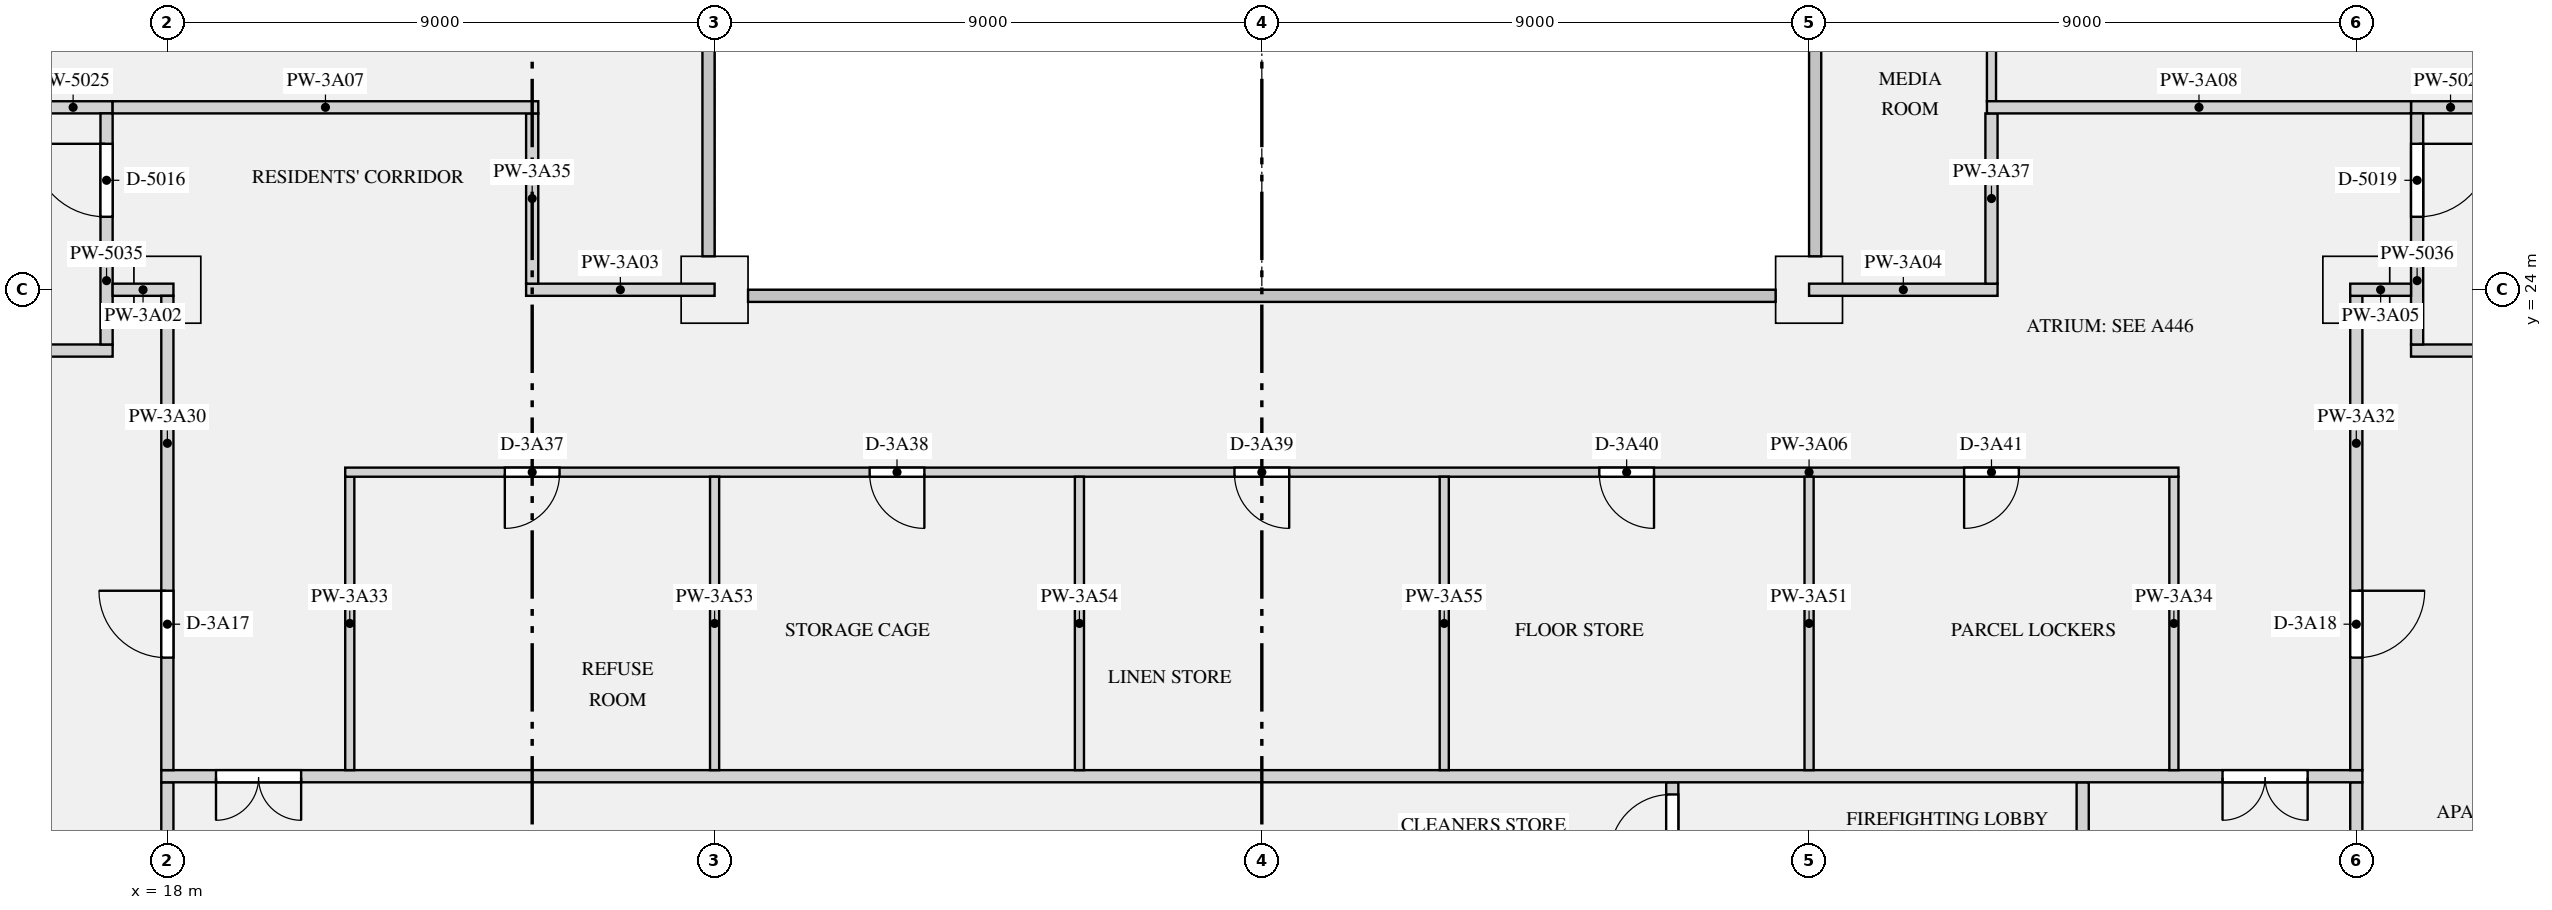
"""IFC4 building model, lengths in metres.
Left out: names, types, materials, properties, quantities, classifications, styles, units other than length and angle.
Written with IfcOpenShell. Run it as: python <this file> out.ifc"""

import sys

from ifc_helpers import new_model, si_unit, direction, frame, frame_2d, origin, origin_2d, place, context, subcontext, project, spatial, rectangle, extrude, element, fill, save


model = new_model("IFC4")
c1 = context("Model", 3, precision=1e-05, world=origin(), true_north=direction((0.0, 1.0)))
c2 = subcontext(c1, "Body", "Model", "MODEL_VIEW")
j1 = project(units=[si_unit("LENGTHUNIT", "METRE"), si_unit("PLANEANGLEUNIT", "RADIAN")], contexts=[c1])
p1 = place(None, origin())
s1 = spatial("IfcSite", under=j1, at=p1, CompositionType="ELEMENT")
p2 = place(p1, origin())
s2 = spatial("IfcBuilding", under=s1, at=p2, CompositionType="ELEMENT")
p3 = place(p2, frame((0.0, 0.0, 144.45)))
s3 = spatial("IfcBuildingStorey", under=s2, at=p3, CompositionType="ELEMENT", Elevation=144.45)
for number, where, z_axis, x_axis in (
    (1, (18.0, 24.0, 0.0), (0.0, 0.0, 1.0), (1.0, 0.0, 0.0)),
    (2, (27.0, 24.0, 0.0), (0.0, 0.0, 1.0), (1.0, 0.0, 0.0)),
    (3, (45.0, 24.0, 0.0), (0.0, 0.0, 1.0), (1.0, 0.0, 0.0)),
    (4, (54.0, 24.0, 0.0), (0.0, 0.0, 1.0), (1.0, 0.0, 0.0)),
):
    element("IfcColumn", number, at=place(p3, frame(where, z_axis=z_axis, x_axis=x_axis)), inside=s3, PredefinedType="COLUMN", context=c2, shape_type="SweptSolid", body=[
        extrude(rectangle(XDim=1.1, YDim=1.1, at=origin_2d()), origin(), (0.0, 0.0, 1.0), 3.15),
    ])
for number, where, z_axis, x_axis in (
    (5, (12.1, 23.0, 0.0), (0.0, 0.0, 1.0), (1.0, 0.0, 0.0)),
    (6, (54.9, 23.0, 0.0), (0.0, 0.0, 1.0), (1.0, 0.0, 0.0)),
):
    element("IfcWall", number, at=place(p3, frame(where, z_axis=z_axis, x_axis=x_axis)), inside=s3, PredefinedType="PARTITIONING", context=c2, shape_type="SweptSolid", body=[
        extrude(rectangle(XDim=5.0, YDim=0.2, at=frame_2d((2.5, 0.0))), origin(), (0.0, 0.0, 1.0), 2.83),
    ])
for number, where, z_axis, x_axis in (
    (7, (15.8, 27.0, 0.0), (0.0, 0.0, 1.0), (1.0, 0.0, 0.0)),
    (8, (54.9, 27.0, 0.0), (0.0, 0.0, 1.0), (1.0, 0.0, 0.0)),
):
    element("IfcWall", number, at=place(p3, frame(where, z_axis=z_axis, x_axis=x_axis)), inside=s3, PredefinedType="PARTITIONING", context=c2, shape_type="SweptSolid", body=[
        extrude(rectangle(XDim=1.3, YDim=0.2, at=frame_2d((0.65, 0.0))), origin(), (0.0, 0.0, 1.0), 2.83),
    ])
p4 = place(p3, frame((18.0, 12.5, 0.0), z_axis=(0.0, 0.0, 1.0), x_axis=(0.0, 1.0, 0.0)))
e9 = element("IfcWall", 9, at=p4, inside=s3, PredefinedType="PARTITIONING", context=c2, shape_type="SweptSolid", body=[
    extrude(rectangle(XDim=3.4, YDim=0.2, at=frame_2d((1.7, 0.0))), origin(), (0.0, 0.0, 1.0), 2.83),
])
p5 = place(p3, frame((49.5, 12.5, 0.0), z_axis=(0.0, 0.0, 1.0), x_axis=(0.0, 1.0, 0.0)))
e10 = element("IfcWall", 10, at=p5, inside=s3, PredefinedType="PARTITIONING", context=c2, shape_type="SweptSolid", body=[
    extrude(rectangle(XDim=3.4, YDim=0.2, at=frame_2d((1.7, 0.0))), origin(), (0.0, 0.0, 1.0), 2.83),
])
p6 = place(p5, frame((1.15, 0.0, 0.0)))
e11 = element("IfcOpeningElement", 11, at=p6, cuts=e10, PredefinedType="OPENING", context=c2, shape_type="SweptSolid", body=[
    extrude(rectangle(XDim=1.1, YDim=2.1, at=frame_2d((0.55, 1.05))), frame((0.0, 0.11, 0.0), z_axis=(0.0, -1.0, 0.0), x_axis=(1.0, 0.0, 0.0)), (0.0, 0.0, 1.0), 0.22),
])
p7 = place(p3, frame((54.0, 12.5, 0.0), z_axis=(0.0, 0.0, 1.0), x_axis=(0.0, 1.0, 0.0)))
e12 = element("IfcWall", 12, at=p7, inside=s3, PredefinedType="PARTITIONING", context=c2, shape_type="SweptSolid", body=[
    extrude(rectangle(XDim=3.4, YDim=0.2, at=frame_2d((1.7, 0.0))), origin(), (0.0, 0.0, 1.0), 2.83),
])
p8 = place(p3, frame((42.75, 14.575, 0.0), z_axis=(0.0, 0.0, 1.0), x_axis=(0.0, 1.0, 0.0)))
e13 = element("IfcWall", 13, at=p8, inside=s3, PredefinedType="PARTITIONING", context=c2, shape_type="SweptSolid", body=[
    extrude(rectangle(XDim=1.325, YDim=0.2, at=frame_2d((0.663, 0.0))), origin(), (0.0, 0.0, 1.0), 2.83),
])
p9 = place(p8, frame((0.125, 0.0, 0.0)))
e14 = element("IfcOpeningElement", 14, at=p9, cuts=e13, PredefinedType="OPENING", context=c2, shape_type="SweptSolid", body=[
    extrude(rectangle(XDim=1.0, YDim=2.1, at=frame_2d((0.5, 1.05))), frame((0.0, 0.11, 0.0), z_axis=(0.0, -1.0, 0.0), x_axis=(1.0, 0.0, 0.0)), (0.0, 0.0, 1.0), 0.22),
])
p10 = place(p3, frame((17.0, 23.1, 0.0), z_axis=(0.0, 0.0, 1.0), x_axis=(0.0, 1.0, 0.0)))
e15 = element("IfcWall", 15, at=p10, inside=s3, PredefinedType="PARTITIONING", context=c2, shape_type="SweptSolid", body=[
    extrude(rectangle(XDim=3.8, YDim=0.2, at=frame_2d((1.9, 0.0))), origin(), (0.0, 0.0, 1.0), 2.83),
])
p11 = place(p10, frame((2.1, 0.0, 0.0)))
e16 = element("IfcOpeningElement", 16, at=p11, cuts=e15, PredefinedType="OPENING", context=c2, shape_type="SweptSolid", body=[
    extrude(rectangle(XDim=1.2, YDim=2.1, at=frame_2d((0.6, 1.05))), frame((0.0, 0.11, 0.0), z_axis=(0.0, -1.0, 0.0), x_axis=(1.0, 0.0, 0.0)), (0.0, 0.0, 1.0), 0.22),
])
p12 = place(p3, frame((55.0, 23.1, 0.0), z_axis=(0.0, 0.0, 1.0), x_axis=(0.0, 1.0, 0.0)))
e17 = element("IfcWall", 17, at=p12, inside=s3, PredefinedType="PARTITIONING", context=c2, shape_type="SweptSolid", body=[
    extrude(rectangle(XDim=3.8, YDim=0.2, at=frame_2d((1.9, 0.0))), origin(), (0.0, 0.0, 1.0), 2.83),
])
p13 = place(p12, frame((2.1, 0.0, 0.0)))
e18 = element("IfcOpeningElement", 18, at=p13, cuts=e17, PredefinedType="OPENING", context=c2, shape_type="SweptSolid", body=[
    extrude(rectangle(XDim=1.2, YDim=2.1, at=frame_2d((0.6, 1.05))), frame((0.0, 0.11, 0.0), z_axis=(0.0, -1.0, 0.0), x_axis=(1.0, 0.0, 0.0)), (0.0, 0.0, 1.0), 0.22),
])
p14 = place(p3, frame((17.1, 24.0, 0.0), z_axis=(0.0, 0.0, 1.0), x_axis=(1.0, 0.0, 0.0)))
e19 = element("IfcWall", 19, at=p14, inside=s3, PredefinedType="PARTITIONING", context=c2, shape_type="SweptSolid", body=[
    extrude(rectangle(XDim=1.0, YDim=0.2, at=frame_2d((0.5, 0.0))), origin(), (0.0, 0.0, 1.0), 2.83),
])
for number, where, z_axis, x_axis in (
    (20, (23.9, 24.0, 0.0), (0.0, 0.0, 1.0), (1.0, 0.0, 0.0)),
    (21, (45.0, 24.0, 0.0), (0.0, 0.0, 1.0), (1.0, 0.0, 0.0)),
):
    element("IfcWall", number, at=place(p3, frame(where, z_axis=z_axis, x_axis=x_axis)), inside=s3, PredefinedType="PARTITIONING", context=c2, shape_type="SweptSolid", body=[
        extrude(rectangle(XDim=3.1, YDim=0.2, at=frame_2d((1.55, 0.0))), origin(), (0.0, 0.0, 1.0), 2.83),
    ])
p15 = place(p3, frame((53.9, 24.0, 0.0), z_axis=(0.0, 0.0, 1.0), x_axis=(1.0, 0.0, 0.0)))
e22 = element("IfcWall", 22, at=p15, inside=s3, PredefinedType="PARTITIONING", context=c2, shape_type="SweptSolid", body=[
    extrude(rectangle(XDim=1.0, YDim=0.2, at=frame_2d((0.5, 0.0))), origin(), (0.0, 0.0, 1.0), 2.83),
])
p16 = place(p3, frame((20.925, 21.0, 0.0), z_axis=(0.0, 0.0, 1.0), x_axis=(1.0, 0.0, 0.0)))
e23 = element("IfcWall", 23, at=p16, inside=s3, PredefinedType="PARTITIONING", context=c2, shape_type="SweptSolid", body=[
    extrude(rectangle(XDim=30.15, YDim=0.15, at=frame_2d((15.075, 0.0))), origin(), (0.0, 0.0, 1.0), 2.83),
])
p17 = place(p16, frame((2.625, 0.0, 0.0)))
e24 = element("IfcOpeningElement", 24, at=p17, cuts=e23, PredefinedType="OPENING", context=c2, shape_type="SweptSolid", body=[
    extrude(rectangle(XDim=0.9, YDim=2.1, at=frame_2d((0.45, 1.05))), frame((0.0, 0.085, 0.0), z_axis=(0.0, -1.0, 0.0), x_axis=(1.0, 0.0, 0.0)), (0.0, 0.0, 1.0), 0.17),
])
p18 = place(p16, frame((8.625, 0.0, 0.0)))
e25 = element("IfcOpeningElement", 25, at=p18, cuts=e23, PredefinedType="OPENING", context=c2, shape_type="SweptSolid", body=[
    extrude(rectangle(XDim=0.9, YDim=2.1, at=frame_2d((0.45, 1.05))), frame((0.0, 0.085, 0.0), z_axis=(0.0, -1.0, 0.0), x_axis=(1.0, 0.0, 0.0)), (0.0, 0.0, 1.0), 0.17),
])
p19 = place(p16, frame((14.625, 0.0, 0.0)))
e26 = element("IfcOpeningElement", 26, at=p19, cuts=e23, PredefinedType="OPENING", context=c2, shape_type="SweptSolid", body=[
    extrude(rectangle(XDim=0.9, YDim=2.1, at=frame_2d((0.45, 1.05))), frame((0.0, 0.085, 0.0), z_axis=(0.0, -1.0, 0.0), x_axis=(1.0, 0.0, 0.0)), (0.0, 0.0, 1.0), 0.17),
])
p20 = place(p16, frame((20.625, 0.0, 0.0)))
e27 = element("IfcOpeningElement", 27, at=p20, cuts=e23, PredefinedType="OPENING", context=c2, shape_type="SweptSolid", body=[
    extrude(rectangle(XDim=0.9, YDim=2.1, at=frame_2d((0.45, 1.05))), frame((0.0, 0.085, 0.0), z_axis=(0.0, -1.0, 0.0), x_axis=(1.0, 0.0, 0.0)), (0.0, 0.0, 1.0), 0.17),
])
p21 = place(p16, frame((26.625, 0.0, 0.0)))
e28 = element("IfcOpeningElement", 28, at=p21, cuts=e23, PredefinedType="OPENING", context=c2, shape_type="SweptSolid", body=[
    extrude(rectangle(XDim=0.9, YDim=2.1, at=frame_2d((0.45, 1.05))), frame((0.0, 0.085, 0.0), z_axis=(0.0, -1.0, 0.0), x_axis=(1.0, 0.0, 0.0)), (0.0, 0.0, 1.0), 0.17),
])
p22 = place(p3, frame((17.1, 27.0, 0.0), z_axis=(0.0, 0.0, 1.0), x_axis=(1.0, 0.0, 0.0)))
e29 = element("IfcWall", 29, at=p22, inside=s3, PredefinedType="PARTITIONING", context=c2, shape_type="SweptSolid", body=[
    extrude(rectangle(XDim=7.0, YDim=0.2, at=frame_2d((3.5, 0.0))), origin(), (0.0, 0.0, 1.0), 2.83),
])
p23 = place(p3, frame((47.925, 27.0, 0.0), z_axis=(0.0, 0.0, 1.0), x_axis=(1.0, 0.0, 0.0)))
e30 = element("IfcWall", 30, at=p23, inside=s3, PredefinedType="PARTITIONING", context=c2, shape_type="SweptSolid", body=[
    extrude(rectangle(XDim=6.975, YDim=0.2, at=frame_2d((3.487, 0.0))), origin(), (0.0, 0.0, 1.0), 2.83),
])
p24 = place(p3, frame((17.9, 16.0, 0.0), z_axis=(0.0, 0.0, 1.0), x_axis=(1.0, 0.0, 0.0)))
e31 = element("IfcWall", 31, at=p24, inside=s3, PredefinedType="PARTITIONING", context=c2, shape_type="SweptSolid", body=[
    extrude(rectangle(XDim=36.2, YDim=0.2, at=frame_2d((18.1, 0.0))), origin(), (0.0, 0.0, 1.0), 2.83),
])
p25 = place(p24, frame((0.9, 0.0, 0.0)))
e32 = element("IfcOpeningElement", 32, at=p25, cuts=e31, PredefinedType="OPENING", context=c2, shape_type="SweptSolid", body=[
    extrude(rectangle(XDim=1.4, YDim=2.1, at=frame_2d((0.7, 1.05))), frame((0.0, 0.11, 0.0), z_axis=(0.0, -1.0, 0.0), x_axis=(1.0, 0.0, 0.0)), (0.0, 0.0, 1.0), 0.22),
])
p26 = place(p24, frame((33.9, 0.0, 0.0)))
e33 = element("IfcOpeningElement", 33, at=p26, cuts=e31, PredefinedType="OPENING", context=c2, shape_type="SweptSolid", body=[
    extrude(rectangle(XDim=1.4, YDim=2.1, at=frame_2d((0.7, 1.05))), frame((0.0, 0.11, 0.0), z_axis=(0.0, -1.0, 0.0), x_axis=(1.0, 0.0, 0.0)), (0.0, 0.0, 1.0), 0.22),
])
p27 = place(p3, frame((18.0, 16.1, 0.0), z_axis=(0.0, 0.0, 1.0), x_axis=(0.0, 1.0, 0.0)))
e34 = element("IfcWall", 34, at=p27, inside=s3, PredefinedType="PARTITIONING", context=c2, shape_type="SweptSolid", body=[
    extrude(rectangle(XDim=7.8, YDim=0.2, at=frame_2d((3.9, 0.0))), origin(), (0.0, 0.0, 1.0), 2.83),
])
p28 = place(p27, frame((1.85, 0.0, 0.0)))
e35 = element("IfcOpeningElement", 35, at=p28, cuts=e34, PredefinedType="OPENING", context=c2, shape_type="SweptSolid", body=[
    extrude(rectangle(XDim=1.1, YDim=2.1, at=frame_2d((0.55, 1.05))), frame((0.0, 0.11, 0.0), z_axis=(0.0, -1.0, 0.0), x_axis=(1.0, 0.0, 0.0)), (0.0, 0.0, 1.0), 0.22),
])
p29 = place(p3, frame((54.0, 16.1, 0.0), z_axis=(0.0, 0.0, 1.0), x_axis=(0.0, 1.0, 0.0)))
e36 = element("IfcWall", 36, at=p29, inside=s3, PredefinedType="PARTITIONING", context=c2, shape_type="SweptSolid", body=[
    extrude(rectangle(XDim=7.8, YDim=0.2, at=frame_2d((3.9, 0.0))), origin(), (0.0, 0.0, 1.0), 2.83),
])
p30 = place(p29, frame((1.85, 0.0, 0.0)))
e37 = element("IfcOpeningElement", 37, at=p30, cuts=e36, PredefinedType="OPENING", context=c2, shape_type="SweptSolid", body=[
    extrude(rectangle(XDim=1.1, YDim=2.1, at=frame_2d((0.55, 1.05))), frame((0.0, 0.11, 0.0), z_axis=(0.0, -1.0, 0.0), x_axis=(1.0, 0.0, 0.0)), (0.0, 0.0, 1.0), 0.22),
])
for number, where, z_axis, x_axis in (
    (38, (21.0, 16.1, 0.0), (0.0, 0.0, 1.0), (0.0, 1.0, 0.0)),
    (39, (51.0, 16.1, 0.0), (0.0, 0.0, 1.0), (0.0, 1.0, 0.0)),
):
    element("IfcWall", number, at=place(p3, frame(where, z_axis=z_axis, x_axis=x_axis)), inside=s3, PredefinedType="PARTITIONING", context=c2, shape_type="SweptSolid", body=[
        extrude(rectangle(XDim=4.825, YDim=0.15, at=frame_2d((2.413, 0.0))), origin(), (0.0, 0.0, 1.0), 2.83),
    ])
p31 = place(p3, frame((24.0, 24.1, 0.0), z_axis=(0.0, 0.0, 1.0), x_axis=(0.0, 1.0, 0.0)))
e40 = element("IfcWall", 40, at=p31, inside=s3, PredefinedType="PARTITIONING", context=c2, shape_type="SweptSolid", body=[
    extrude(rectangle(XDim=2.8, YDim=0.2, at=frame_2d((1.4, 0.0))), origin(), (0.0, 0.0, 1.0), 2.83),
])
p32 = place(p3, frame((48.0, 27.1, 0.0), z_axis=(0.0, 0.0, 1.0), x_axis=(0.0, 1.0, 0.0)))
e41 = element("IfcWall", 41, at=p32, inside=s3, PredefinedType="PARTITIONING", context=c2, shape_type="SweptSolid", body=[
    extrude(rectangle(XDim=8.325, YDim=0.15, at=frame_2d((4.163, 0.0))), origin(), (0.0, 0.0, 1.0), 2.83),
])
p33 = place(p3, frame((48.0, 24.1, 0.0), z_axis=(0.0, 0.0, 1.0), x_axis=(0.0, 1.0, 0.0)))
e42 = element("IfcWall", 42, at=p33, inside=s3, PredefinedType="PARTITIONING", context=c2, shape_type="SweptSolid", body=[
    extrude(rectangle(XDim=2.8, YDim=0.2, at=frame_2d((1.4, 0.0))), origin(), (0.0, 0.0, 1.0), 2.83),
])
for number, where, z_axis, x_axis in (
    (43, (45.0, 16.1, 0.0), (0.0, 0.0, 1.0), (0.0, 1.0, 0.0)),
    (44, (27.0, 16.1, 0.0), (0.0, 0.0, 1.0), (0.0, 1.0, 0.0)),
    (45, (33.0, 16.1, 0.0), (0.0, 0.0, 1.0), (0.0, 1.0, 0.0)),
    (46, (39.0, 16.1, 0.0), (0.0, 0.0, 1.0), (0.0, 1.0, 0.0)),
):
    element("IfcWall", number, at=place(p3, frame(where, z_axis=z_axis, x_axis=x_axis)), inside=s3, PredefinedType="PARTITIONING", context=c2, shape_type="SweptSolid", body=[
        extrude(rectangle(XDim=4.825, YDim=0.15, at=frame_2d((2.413, 0.0))), origin(), (0.0, 0.0, 1.0), 2.83),
    ])
p34 = place(p11, origin())
e47 = element("IfcDoor", 47, at=p34, inside=s3, OperationType="SINGLE_SWING_RIGHT", PredefinedType="DOOR", context=c2, shape_type="SweptSolid", body=[
    extrude(rectangle(XDim=1.2, YDim=2.1, at=frame_2d((0.6, 1.05))), frame((0.0, 0.025, 0.0), z_axis=(0.0, -1.0, 0.0), x_axis=(1.0, 0.0, 0.0)), (0.0, 0.0, 1.0), 0.05),
])
fill(e16, e47)
p35 = place(p13, frame((1.2, 0.0, 0.0), z_axis=(0.0, 0.0, 1.0), x_axis=(-1.0, 0.0, 0.0)))
e48 = element("IfcDoor", 48, at=p35, inside=s3, OperationType="SINGLE_SWING_LEFT", PredefinedType="DOOR", context=c2, shape_type="SweptSolid", body=[
    extrude(rectangle(XDim=1.2, YDim=2.1, at=frame_2d((0.6, 1.05))), frame((0.0, 0.025, 0.0), z_axis=(0.0, -1.0, 0.0), x_axis=(1.0, 0.0, 0.0)), (0.0, 0.0, 1.0), 0.05),
])
fill(e18, e48)
p36 = place(p9, origin())
e49 = element("IfcDoor", 49, at=p36, inside=s3, OperationType="SINGLE_SWING_LEFT", PredefinedType="DOOR", context=c2, shape_type="SweptSolid", body=[
    extrude(rectangle(XDim=1.0, YDim=2.1, at=frame_2d((0.5, 1.05))), frame((0.0, 0.025, 0.0), z_axis=(0.0, -1.0, 0.0), x_axis=(1.0, 0.0, 0.0)), (0.0, 0.0, 1.0), 0.05),
])
fill(e14, e49)
p37 = place(p25, frame((1.4, 0.0, 0.0), z_axis=(0.0, 0.0, 1.0), x_axis=(-1.0, 0.0, 0.0)))
e50 = element("IfcDoor", 50, at=p37, inside=s3, OperationType="DOUBLE_DOOR_SINGLE_SWING", PredefinedType="DOOR", context=c2, shape_type="SweptSolid", body=[
    extrude(rectangle(XDim=1.4, YDim=2.1, at=frame_2d((0.7, 1.05))), frame((0.0, 0.025, 0.0), z_axis=(0.0, -1.0, 0.0), x_axis=(1.0, 0.0, 0.0)), (0.0, 0.0, 1.0), 0.05),
])
fill(e32, e50)
p38 = place(p26, frame((1.4, 0.0, 0.0), z_axis=(0.0, 0.0, 1.0), x_axis=(-1.0, 0.0, 0.0)))
e51 = element("IfcDoor", 51, at=p38, inside=s3, OperationType="DOUBLE_DOOR_SINGLE_SWING", PredefinedType="DOOR", context=c2, shape_type="SweptSolid", body=[
    extrude(rectangle(XDim=1.4, YDim=2.1, at=frame_2d((0.7, 1.05))), frame((0.0, 0.025, 0.0), z_axis=(0.0, -1.0, 0.0), x_axis=(1.0, 0.0, 0.0)), (0.0, 0.0, 1.0), 0.05),
])
fill(e33, e51)
p39 = place(p28, origin())
e52 = element("IfcDoor", 52, at=p39, inside=s3, OperationType="SINGLE_SWING_RIGHT", PredefinedType="DOOR", context=c2, shape_type="SweptSolid", body=[
    extrude(rectangle(XDim=1.1, YDim=2.1, at=frame_2d((0.55, 1.05))), frame((0.0, 0.025, 0.0), z_axis=(0.0, -1.0, 0.0), x_axis=(1.0, 0.0, 0.0)), (0.0, 0.0, 1.0), 0.05),
])
fill(e35, e52)
p40 = place(p30, frame((1.1, 0.0, 0.0), z_axis=(0.0, 0.0, 1.0), x_axis=(-1.0, 0.0, 0.0)))
e53 = element("IfcDoor", 53, at=p40, inside=s3, OperationType="SINGLE_SWING_LEFT", PredefinedType="DOOR", context=c2, shape_type="SweptSolid", body=[
    extrude(rectangle(XDim=1.1, YDim=2.1, at=frame_2d((0.55, 1.05))), frame((0.0, 0.025, 0.0), z_axis=(0.0, -1.0, 0.0), x_axis=(1.0, 0.0, 0.0)), (0.0, 0.0, 1.0), 0.05),
])
fill(e37, e53)
p41 = place(p17, frame((0.9, 0.0, 0.0), z_axis=(0.0, 0.0, 1.0), x_axis=(-1.0, 0.0, 0.0)))
e54 = element("IfcDoor", 54, at=p41, inside=s3, OperationType="SINGLE_SWING_RIGHT", PredefinedType="DOOR", context=c2, shape_type="SweptSolid", body=[
    extrude(rectangle(XDim=0.9, YDim=2.1, at=frame_2d((0.45, 1.05))), frame((0.0, 0.025, 0.0), z_axis=(0.0, -1.0, 0.0), x_axis=(1.0, 0.0, 0.0)), (0.0, 0.0, 1.0), 0.05),
])
fill(e24, e54)
p42 = place(p18, frame((0.9, 0.0, 0.0), z_axis=(0.0, 0.0, 1.0), x_axis=(-1.0, 0.0, 0.0)))
e55 = element("IfcDoor", 55, at=p42, inside=s3, OperationType="SINGLE_SWING_LEFT", PredefinedType="DOOR", context=c2, shape_type="SweptSolid", body=[
    extrude(rectangle(XDim=0.9, YDim=2.1, at=frame_2d((0.45, 1.05))), frame((0.0, 0.025, 0.0), z_axis=(0.0, -1.0, 0.0), x_axis=(1.0, 0.0, 0.0)), (0.0, 0.0, 1.0), 0.05),
])
fill(e25, e55)
p43 = place(p19, frame((0.9, 0.0, 0.0), z_axis=(0.0, 0.0, 1.0), x_axis=(-1.0, 0.0, 0.0)))
e56 = element("IfcDoor", 56, at=p43, inside=s3, OperationType="SINGLE_SWING_LEFT", PredefinedType="DOOR", context=c2, shape_type="SweptSolid", body=[
    extrude(rectangle(XDim=0.9, YDim=2.1, at=frame_2d((0.45, 1.05))), frame((0.0, 0.025, 0.0), z_axis=(0.0, -1.0, 0.0), x_axis=(1.0, 0.0, 0.0)), (0.0, 0.0, 1.0), 0.05),
])
fill(e26, e56)
p44 = place(p20, frame((0.9, 0.0, 0.0), z_axis=(0.0, 0.0, 1.0), x_axis=(-1.0, 0.0, 0.0)))
e57 = element("IfcDoor", 57, at=p44, inside=s3, OperationType="SINGLE_SWING_LEFT", PredefinedType="DOOR", context=c2, shape_type="SweptSolid", body=[
    extrude(rectangle(XDim=0.9, YDim=2.1, at=frame_2d((0.45, 1.05))), frame((0.0, 0.025, 0.0), z_axis=(0.0, -1.0, 0.0), x_axis=(1.0, 0.0, 0.0)), (0.0, 0.0, 1.0), 0.05),
])
fill(e27, e57)
p45 = place(p21, frame((0.9, 0.0, 0.0), z_axis=(0.0, 0.0, 1.0), x_axis=(-1.0, 0.0, 0.0)))
e58 = element("IfcDoor", 58, at=p45, inside=s3, OperationType="SINGLE_SWING_RIGHT", PredefinedType="DOOR", context=c2, shape_type="SweptSolid", body=[
    extrude(rectangle(XDim=0.9, YDim=2.1, at=frame_2d((0.45, 1.05))), frame((0.0, 0.025, 0.0), z_axis=(0.0, -1.0, 0.0), x_axis=(1.0, 0.0, 0.0)), (0.0, 0.0, 1.0), 0.05),
])
fill(e28, e58)
save(model, sys.argv[1])
